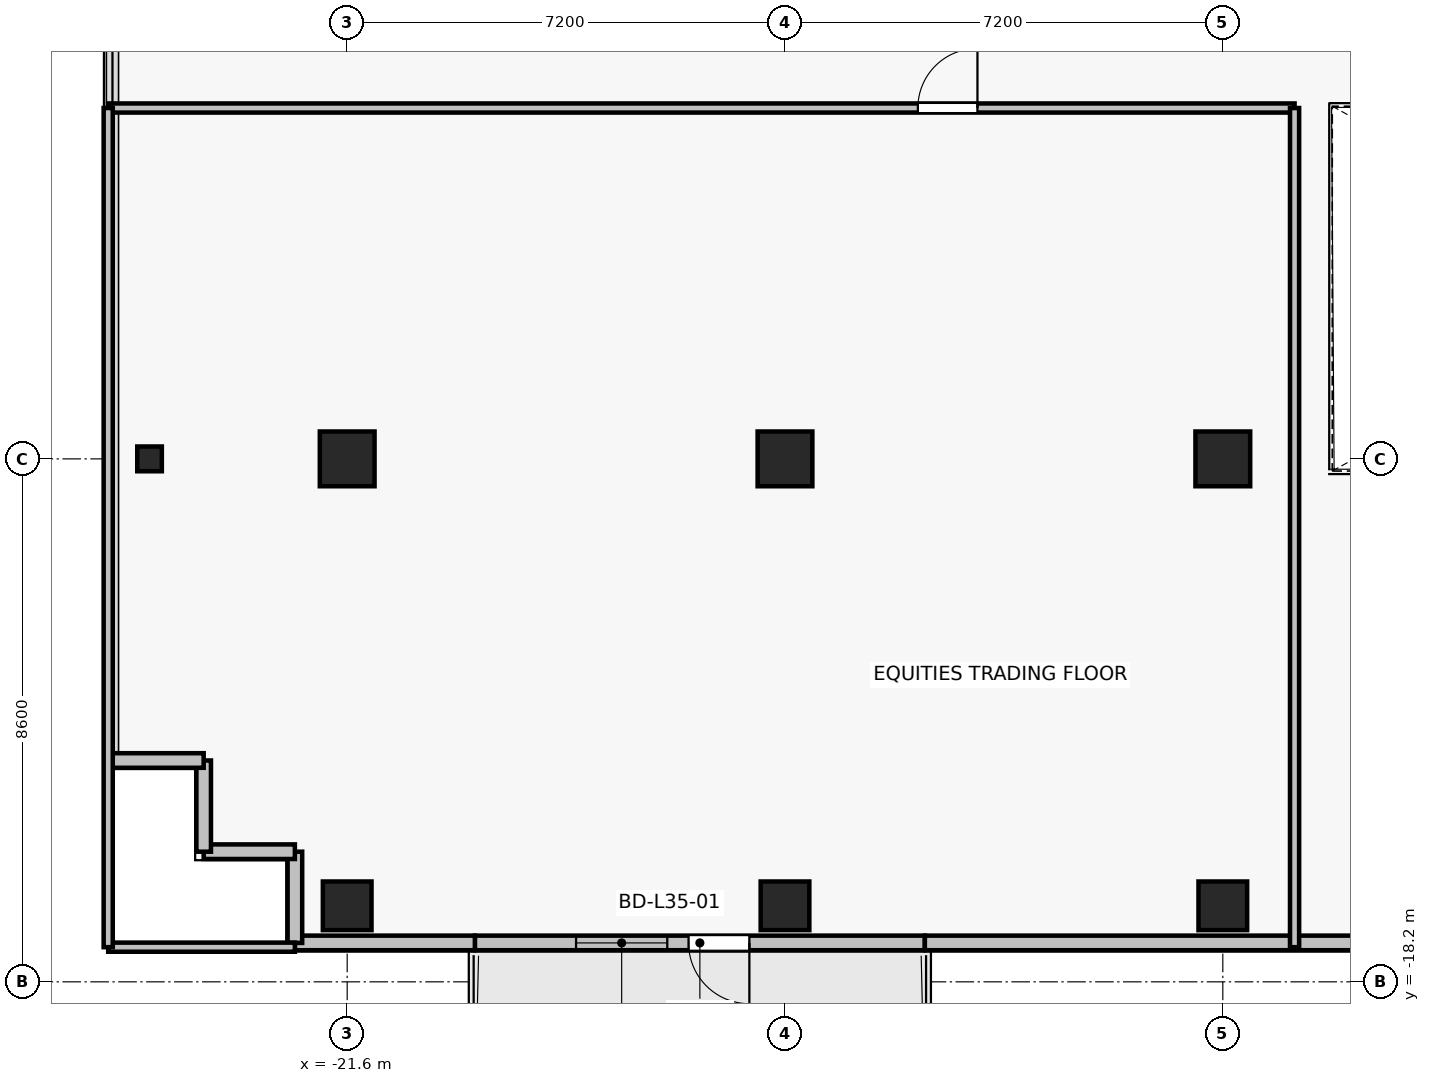
"""IFC4 building model, lengths in metres.
Left out: names, types, materials, properties, quantities, classifications, styles, units other than length and angle.
Written with IfcOpenShell. Run it as: python <this file> out.ifc"""

import sys

from ifc_helpers import new_model, si_unit, direction, frame, frame_2d, origin, origin_2d, place, context, subcontext, project, spatial, rectangle, i_section, extrude, source, transform, mapped, element, fill, save


model = new_model("IFC4")
c1 = context("Model", 3, precision=1e-05, world=origin(), true_north=direction((0.0, 1.0)))
c2 = subcontext(c1, "Body", "Model", "MODEL_VIEW")
j1 = project(units=[si_unit("LENGTHUNIT", "METRE"), si_unit("PLANEANGLEUNIT", "RADIAN")], contexts=[c1])
p1 = place(None, origin())
s1 = spatial("IfcSite", under=j1, at=p1, CompositionType="ELEMENT")
p2 = place(p1, origin())
s2 = spatial("IfcBuilding", under=s1, at=p2, CompositionType="ELEMENT")
p3 = place(p2, frame((0.0, 0.0, 126.4)))
s3 = spatial("IfcBuildingStorey", under=s2, at=p3, CompositionType="ELEMENT", Elevation=126.4)
for number, where, z_axis, x_axis in (
    (1, (-14.4, -9.6, 0.0), (0.0, 0.0, 1.0), (1.0, 0.0, 0.0)),
    (2, (-7.2, -9.6, 0.0), (0.0, 0.0, 1.0), (1.0, 0.0, 0.0)),
    (3, (-21.6, -9.6, 0.0), (0.0, 0.0, 1.0), (1.0, 0.0, 0.0)),
):
    element("IfcColumn", number, at=place(p3, frame(where, z_axis=z_axis, x_axis=x_axis)), inside=s3, PredefinedType="COLUMN", context=c2, shape_type="SweptSolid", body=[
        extrude(rectangle(XDim=0.9, YDim=0.9, at=origin_2d()), origin(), (0.0, 0.0, 1.0), 3.3),
    ])
for number, where, z_axis, x_axis in (
    (4, (-14.4, -16.95, 0.0), (0.0, 0.0, 1.0), (1.0, 0.0, 0.0)),
    (5, (-7.2, -16.95, 0.0), (0.0, 0.0, 1.0), (1.0, 0.0, 0.0)),
    (6, (-21.6, -16.95, 0.0), (0.0, 0.0, 1.0), (1.0, 0.0, 0.0)),
):
    element("IfcColumn", number, at=place(p3, frame(where, z_axis=z_axis, x_axis=x_axis)), inside=s3, PredefinedType="COLUMN", context=c2, shape_type="SweptSolid", body=[
        extrude(rectangle(XDim=0.8, YDim=0.8, at=origin_2d()), origin(), (0.0, 0.0, 1.0), 3.3),
    ])
p4 = place(p3, frame((-24.85, -9.6, 0.0), z_axis=(0.0, 0.0, 1.0), x_axis=(1.0, 0.0, 0.0)))
e7 = element("IfcColumn", 7, at=p4, inside=s3, PredefinedType="COLUMN", context=c2, shape_type="SweptSolid", body=[
    extrude(i_section(OverallWidth=0.404, OverallDepth=0.407, WebThickness=0.022, FlangeThickness=0.032, FilletRadius=0.015, at=origin_2d()), origin(), (0.0, 0.0, 1.0), 3.3),
])
p5 = place(p3, frame((-12.1, -17.56, 0.0), z_axis=(0.0, 0.0, 1.0), x_axis=(-1.0, 0.0, 0.0)))
e8 = element("IfcWall", 8, at=p5, inside=s3, PredefinedType="SOLIDWALL", context=c2, shape_type="SweptSolid", body=[
    extrude(rectangle(XDim=7.4, YDim=0.24, at=frame_2d((3.7, 0.0))), origin(), (0.0, 0.0, 1.0), 2.665),
])
p6 = place(p5, frame((2.886, 0.0, 0.0)))
e9 = element("IfcOpeningElement", 9, at=p6, cuts=e8, PredefinedType="OPENING", context=c2, shape_type="SweptSolid", body=[
    extrude(rectangle(XDim=1.0, YDim=2.2, at=frame_2d((0.5, 1.1))), frame((0.0, 0.13, 0.0), z_axis=(0.0, -1.0, 0.0), x_axis=(1.0, 0.0, 0.0)), (0.0, 0.0, 1.0), 0.26),
])
p7 = place(p5, frame((4.236, 0.0, 0.85)))
e10 = element("IfcOpeningElement", 10, at=p7, cuts=e8, PredefinedType="OPENING", context=c2, shape_type="SweptSolid", body=[
    extrude(rectangle(XDim=1.5, YDim=1.6, at=frame_2d((0.75, 0.8))), frame((0.0, 0.13, 0.0), z_axis=(0.0, -1.0, 0.0), x_axis=(1.0, 0.0, 0.0)), (0.0, 0.0, 1.0), 0.26),
])
p8 = place(p3, frame((-12.1, -17.56, 0.0), z_axis=(0.0, 0.0, 1.0), x_axis=(1.0, 0.0, 0.0)))
e11 = element("IfcWall", 11, at=p8, inside=s3, PredefinedType="SOLIDWALL", context=c2, shape_type="SweptSolid", body=[
    extrude(rectangle(XDim=8.76, YDim=0.24, at=frame_2d((4.38, 0.0))), origin(), (0.0, 0.0, 1.0), 3.075),
])
p9 = place(p3, frame((-22.46, -17.56, 0.0), z_axis=(0.0, 0.0, 1.0), x_axis=(1.0, 0.0, 0.0)))
e12 = element("IfcWall", 12, at=p9, inside=s3, PredefinedType="SOLIDWALL", context=c2, shape_type="SweptSolid", body=[
    extrude(rectangle(XDim=2.96, YDim=0.24, at=frame_2d((1.48, 0.0))), origin(), (0.0, 0.0, 1.0), 2.665),
])
p10 = place(p3, frame((-22.46, -16.06, 0.0), z_axis=(0.0, 0.0, 1.0), x_axis=(0.0, -1.0, 0.0)))
e13 = element("IfcWall", 13, at=p10, inside=s3, PredefinedType="SOLIDWALL", context=c2, shape_type="SweptSolid", body=[
    extrude(rectangle(XDim=1.5, YDim=0.24, at=frame_2d((0.75, 0.0))), origin(), (0.0, 0.0, 1.0), 2.565),
])
for number, where, z_axis, x_axis in (
    (14, (-23.96, -16.06, 0.0), (0.0, 0.0, 1.0), (1.0, 0.0, 0.0)),
    (15, (-23.96, -14.56, 0.0), (0.0, 0.0, 1.0), (0.0, -1.0, 0.0)),
    (16, (-25.46, -14.56, 0.0), (0.0, 0.0, 1.0), (1.0, 0.0, 0.0)),
):
    element("IfcWall", number, at=place(p3, frame(where, z_axis=z_axis, x_axis=x_axis)), inside=s3, PredefinedType="SOLIDWALL", context=c2, shape_type="SweptSolid", body=[
        extrude(rectangle(XDim=1.5, YDim=0.24, at=frame_2d((0.75, 0.0))), origin(), (0.0, 0.0, 1.0), 3.075),
    ])
p11 = place(p3, frame((-22.46, -17.63, 0.0), z_axis=(0.0, 0.0, 1.0), x_axis=(-1.0, 0.0, 0.0)))
e17 = element("IfcWall", 17, at=p11, inside=s3, PredefinedType="PARTITIONING", context=c2, shape_type="SweptSolid", body=[
    extrude(rectangle(XDim=3.07, YDim=0.15, at=frame_2d((1.535, 0.0))), origin(), (0.0, 0.0, 1.0), 2.665),
])
p12 = place(p3, frame((-25.53, -3.83, 0.0), z_axis=(0.0, 0.0, 1.0), x_axis=(1.0, 0.0, 0.0)))
e18 = element("IfcWall", 18, at=p12, inside=s3, PredefinedType="PARTITIONING", context=c2, shape_type="SweptSolid", body=[
    extrude(rectangle(XDim=19.51, YDim=0.15, at=frame_2d((9.755, 0.0))), origin(), (0.0, 0.0, 1.0), 2.515),
])
p13 = place(p12, frame((13.315, 0.0, 0.0)))
e19 = element("IfcOpeningElement", 19, at=p13, cuts=e18, PredefinedType="OPENING", context=c2, shape_type="SweptSolid", body=[
    extrude(rectangle(XDim=0.98, YDim=2.15, at=frame_2d((0.49, 1.075))), frame((0.0, 0.085, 0.0), z_axis=(0.0, -1.0, 0.0), x_axis=(1.0, 0.0, 0.0)), (0.0, 0.0, 1.0), 0.17),
])
p14 = place(p3, frame((-25.53, -17.63, 0.0), z_axis=(0.0, 0.0, 1.0), x_axis=(0.0, 1.0, 0.0)))
e20 = element("IfcWall", 20, at=p14, inside=s3, PredefinedType="PARTITIONING", context=c2, shape_type="SweptSolid", body=[
    extrude(rectangle(XDim=13.8, YDim=0.15, at=frame_2d((6.9, 0.0))), origin(), (0.0, 0.0, 1.0), 2.665),
])
p15 = place(p3, frame((-6.02, -3.83, 0.0), z_axis=(0.0, 0.0, 1.0), x_axis=(0.0, -1.0, 0.0)))
e21 = element("IfcWall", 21, at=p15, inside=s3, PredefinedType="PARTITIONING", context=c2, shape_type="SweptSolid", body=[
    extrude(rectangle(XDim=13.8, YDim=0.15, at=frame_2d((6.9, 0.0))), origin(), (0.0, 0.0, 1.0), 2.515),
])
m1 = source(origin(), c2, "Body", "SweptSolid", [
    extrude(rectangle(XDim=1.0, YDim=2.2, at=frame_2d((0.5, 1.1))), frame((0.0, 0.025, 0.0), z_axis=(0.0, -1.0, 0.0), x_axis=(1.0, 0.0, 0.0)), (0.0, 0.0, 1.0), 0.05),
])
p16 = place(p6, origin())
e22 = element("IfcDoor", 22, at=p16, inside=s3, OperationType="SINGLE_SWING_LEFT", PredefinedType="DOOR", context=c2, shape_type="MappedRepresentation", body=[
    mapped(m1, transform((0.0, 0.0, 0.0), x_axis=(1.0, 0.0, 0.0), y_axis=(0.0, 1.0, 0.0), z_axis=(0.0, 0.0, 1.0), scale=1.0)),
])
fill(e9, e22)
m2 = source(origin(), c2, "Body", "SweptSolid", [
    extrude(rectangle(XDim=1.5, YDim=1.6, at=frame_2d((0.75, 0.8))), frame((0.0, 0.03, 0.0), z_axis=(0.0, -1.0, 0.0), x_axis=(1.0, 0.0, 0.0)), (0.0, 0.0, 1.0), 0.06),
])
p17 = place(p7, origin())
e23 = element("IfcWindow", 23, at=p17, inside=s3, PartitioningType="SINGLE_PANEL", PredefinedType="WINDOW", context=c2, shape_type="MappedRepresentation", body=[
    mapped(m2, transform((0.0, 0.0, 0.0), x_axis=(1.0, 0.0, 0.0), y_axis=(0.0, 1.0, 0.0), z_axis=(0.0, 0.0, 1.0), scale=1.0)),
])
fill(e10, e23)
m3 = source(origin(), c2, "Body", "SweptSolid", [
    extrude(rectangle(XDim=0.98, YDim=2.15, at=frame_2d((0.49, 1.075))), frame((0.0, 0.025, 0.0), z_axis=(0.0, -1.0, 0.0), x_axis=(1.0, 0.0, 0.0)), (0.0, 0.0, 1.0), 0.05),
])
p18 = place(p13, origin())
e24 = element("IfcDoor", 24, at=p18, inside=s3, OperationType="SINGLE_SWING_RIGHT", PredefinedType="DOOR", context=c2, shape_type="MappedRepresentation", body=[
    mapped(m3, transform((0.0, 0.0, 0.0), x_axis=(1.0, 0.0, 0.0), y_axis=(0.0, 1.0, 0.0), z_axis=(0.0, 0.0, 1.0), scale=1.0)),
])
fill(e19, e24)
save(model, sys.argv[1])
